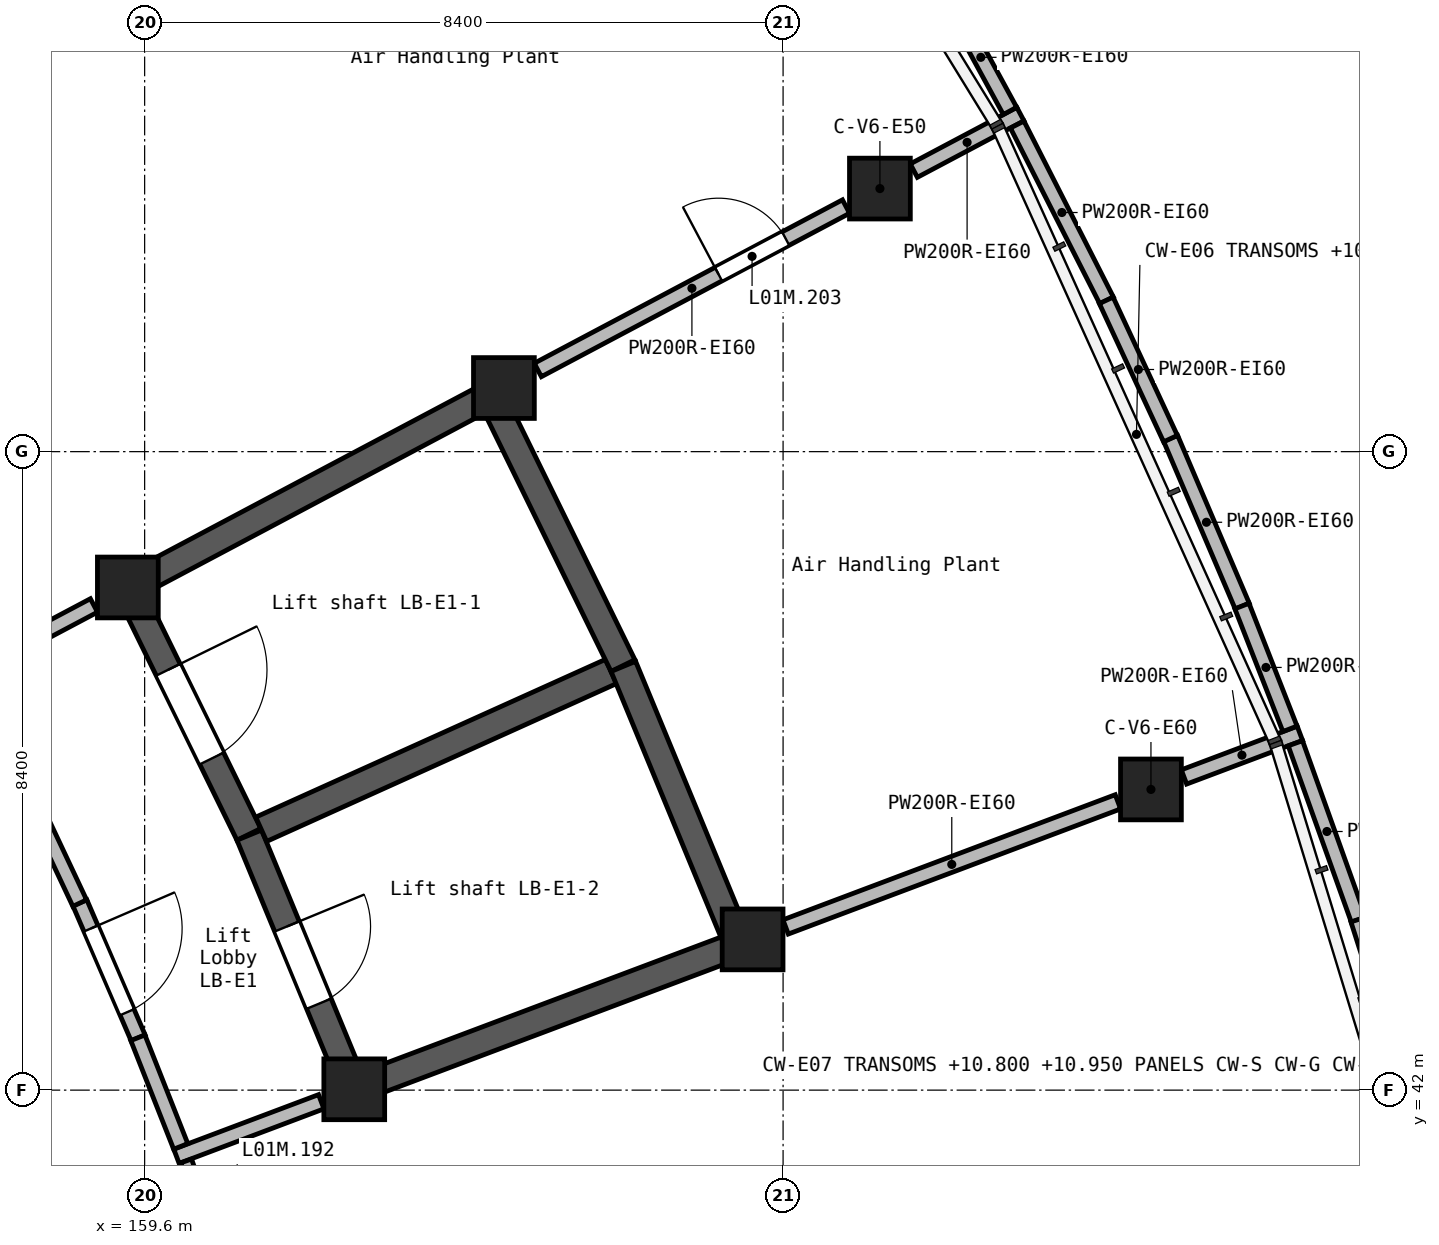
"""IFC4 building model, lengths in metres.
Left out: names, types, materials, properties, quantities, classifications, styles, units other than length and angle.
Written with IfcOpenShell. Run it as: python <this file> out.ifc"""

import sys

from ifc_helpers import new_model, si_unit, direction, frame, frame_2d, origin, origin_2d, place, context, subcontext, project, spatial, rectangle, extrude, element, fill, save


model = new_model("IFC4")
c1 = context("Model", 3, precision=1e-05, world=origin(), true_north=direction((0.0, 1.0)))
c2 = subcontext(c1, "Body", "Model", "MODEL_VIEW")
j1 = project(units=[si_unit("LENGTHUNIT", "METRE"), si_unit("PLANEANGLEUNIT", "RADIAN")], contexts=[c1])
p1 = place(None, origin())
s1 = spatial("IfcSite", under=j1, at=p1, CompositionType="ELEMENT")
p2 = place(p1, origin())
s2 = spatial("IfcBuilding", under=s1, at=p2, CompositionType="ELEMENT")
p3 = place(p2, frame((0.0, 0.0, 9.9)))
s3 = spatial("IfcBuildingStorey", under=s2, at=p3, CompositionType="ELEMENT", Elevation=9.9)
for number, where, z_axis, x_axis in (
    (1, (159.379, 48.613, 0.0), (0.0, 0.0, 1.0), (1.0, 0.0, 0.0)),
    (2, (162.358, 42.011, 0.0), (0.0, 0.0, 1.0), (1.0, 0.0, 0.0)),
    (3, (164.327, 51.237, 0.0), (0.0, 0.0, 1.0), (1.0, 0.0, 0.0)),
    (4, (167.599, 43.983, 0.0), (0.0, 0.0, 1.0), (1.0, 0.0, 0.0)),
    (5, (169.274, 53.861, 0.0), (0.0, 0.0, 1.0), (1.0, 0.0, 0.0)),
    (6, (172.84, 45.956, 0.0), (0.0, 0.0, 1.0), (1.0, 0.0, 0.0)),
):
    element("IfcColumn", number, at=place(p3, frame(where, z_axis=z_axis, x_axis=x_axis)), inside=s3, PredefinedType="COLUMN", context=c2, shape_type="SweptSolid", body=[
        extrude(rectangle(XDim=0.8, YDim=0.8, at=origin_2d()), origin(), (0.0, 0.0, 1.0), 2.7),
    ])
p4 = place(p3, frame((159.224, 48.531, 0.0), z_axis=(0.0, 0.0, 1.0), x_axis=(0.883393138637, 0.468632652094, 0.0)))
e7 = element("IfcWall", 7, at=p4, inside=s3, PredefinedType="SHEAR", context=c2, shape_type="SweptSolid", body=[
    extrude(rectangle(XDim=5.751, YDim=0.35, at=frame_2d((2.875, 0.0))), origin(), (0.0, 0.0, 1.0), 2.7),
])
p5 = place(p3, frame((159.456, 48.456, 0.0), z_axis=(0.0, 0.0, 1.0), x_axis=(0.440221126053, -0.89788939195, 0.0)))
e8 = element("IfcWall", 8, at=p5, inside=s3, PredefinedType="SHEAR", context=c2, shape_type="SweptSolid", body=[
    extrude(rectangle(XDim=3.442, YDim=0.35, at=frame_2d((1.721, 0.0))), origin(), (0.0, 0.0, 1.0), 2.7),
])
p6 = place(p5, frame((1.031, 0.0, 0.0)))
e9 = element("IfcOpeningElement", 9, at=p6, cuts=e8, PredefinedType="OPENING", context=c2, shape_type="SweptSolid", body=[
    extrude(rectangle(XDim=1.3, YDim=2.1, at=frame_2d((0.65, 1.05))), frame((0.0, 0.185, 0.0), z_axis=(0.0, -1.0, 0.0), x_axis=(1.0, 0.0, 0.0)), (0.0, 0.0, 1.0), 0.37),
])
p7 = place(p3, frame((160.976, 45.355, 0.0), z_axis=(0.0, 0.0, 1.0), x_axis=(0.381990591944, -0.924166212143, 0.0)))
e10 = element("IfcWall", 10, at=p7, inside=s3, PredefinedType="SHEAR", context=c2, shape_type="SweptSolid", body=[
    extrude(rectangle(XDim=3.443, YDim=0.35, at=frame_2d((1.721, 0.0))), origin(), (0.0, 0.0, 1.0), 2.7),
])
p8 = place(p7, frame((1.3, 0.0, 0.0)))
e11 = element("IfcOpeningElement", 11, at=p8, cuts=e10, PredefinedType="OPENING", context=c2, shape_type="SweptSolid", body=[
    extrude(rectangle(XDim=1.1, YDim=2.1, at=frame_2d((0.55, 1.05))), frame((0.0, 0.185, 0.0), z_axis=(0.0, -1.0, 0.0), x_axis=(1.0, 0.0, 0.0)), (0.0, 0.0, 1.0), 0.37),
])
p9 = place(p3, frame((161.134, 45.432, 0.0), z_axis=(0.0, 0.0, 1.0), x_axis=(0.911564728385, 0.411156595427, 0.0)))
e12 = element("IfcWall", 12, at=p9, inside=s3, PredefinedType="SHEAR", context=c2, shape_type="SweptSolid", body=[
    extrude(rectangle(XDim=5.05, YDim=0.35, at=frame_2d((2.525, 0.0))), origin(), (0.0, 0.0, 1.0), 2.7),
])
p10 = place(p3, frame((162.194, 41.949, 0.0), z_axis=(0.0, 0.0, 1.0), x_axis=(0.935920223106, 0.352212061095, 0.0)))
e13 = element("IfcWall", 13, at=p10, inside=s3, PredefinedType="SHEAR", context=c2, shape_type="SweptSolid", body=[
    extrude(rectangle(XDim=5.75, YDim=0.35, at=frame_2d((2.875, 0.0))), origin(), (0.0, 0.0, 1.0), 2.7),
])
p11 = place(p3, frame((165.894, 47.585, 0.0), z_axis=(0.0, 0.0, 1.0), x_axis=(-0.43992897418, 0.898032570499, 0.0)))
e14 = element("IfcWall", 14, at=p11, inside=s3, PredefinedType="SHEAR", context=c2, shape_type="SweptSolid", body=[
    extrude(rectangle(XDim=3.788, YDim=0.35, at=frame_2d((1.894, 0.0))), origin(), (0.0, 0.0, 1.0), 2.7),
])
p12 = place(p3, frame((167.345, 44.075, 0.0), z_axis=(0.0, 0.0, 1.0), x_axis=(-0.382046231428, 0.924143212415, 0.0)))
e15 = element("IfcWall", 15, at=p12, inside=s3, PredefinedType="SHEAR", context=c2, shape_type="SweptSolid", body=[
    extrude(rectangle(XDim=3.788, YDim=0.35, at=frame_2d((1.894, 0.0))), origin(), (0.0, 0.0, 1.0), 2.7),
])
p13 = place(p3, frame((156.036, 55.103, 0.0), z_axis=(0.0, 0.0, 1.0), x_axis=(0.816634904938, 0.57715459977, 0.0)))
e16 = element("IfcWall", 16, at=p13, inside=s3, PredefinedType="SOLIDWALL", context=c2, shape_type="SweptSolid", body=[
    extrude(rectangle(XDim=4.493, YDim=0.2, at=frame_2d((2.246, 0.0))), origin(), (0.0, 0.0, 1.0), 2.45),
])
p14 = place(p3, frame((168.033, 44.147, 0.0), z_axis=(0.0, 0.0, 1.0), x_axis=(0.935873083575, 0.352337297826, 0.0)))
e17 = element("IfcWall", 17, at=p14, inside=s3, PredefinedType="SOLIDWALL", context=c2, shape_type="SweptSolid", body=[
    extrude(rectangle(XDim=4.672, YDim=0.2, at=frame_2d((2.336, 0.0))), origin(), (0.0, 0.0, 1.0), 2.45),
])
p15 = place(p3, frame((173.274, 46.12, 0.0), z_axis=(0.0, 0.0, 1.0), x_axis=(0.9359160175, 0.352223236296, 0.0)))
e18 = element("IfcWall", 18, at=p15, inside=s3, PredefinedType="SOLIDWALL", context=c2, shape_type="SweptSolid", body=[
    extrude(rectangle(XDim=1.63, YDim=0.2, at=frame_2d((0.815, 0.0))), origin(), (0.0, 0.0, 1.0), 2.45),
])
p16 = place(p3, frame((164.773, 51.474, 0.0), z_axis=(0.0, 0.0, 1.0), x_axis=(0.883491454613, 0.468447275182, 0.0)))
e19 = element("IfcWall", 19, at=p16, inside=s3, PredefinedType="SOLIDWALL", context=c2, shape_type="SweptSolid", body=[
    extrude(rectangle(XDim=4.59, YDim=0.2, at=frame_2d((2.295, 0.0))), origin(), (0.0, 0.0, 1.0), 2.45),
])
p17 = place(p16, frame((2.691, 0.0, 0.0)))
e20 = element("IfcOpeningElement", 20, at=p17, cuts=e19, PredefinedType="OPENING", context=c2, shape_type="SweptSolid", body=[
    extrude(rectangle(XDim=1.0, YDim=2.1, at=frame_2d((0.5, 1.05))), frame((0.0, 0.11, 0.0), z_axis=(0.0, -1.0, 0.0), x_axis=(1.0, 0.0, 0.0)), (0.0, 0.0, 1.0), 0.22),
])
p18 = place(p3, frame((169.72, 54.097, 0.0), z_axis=(0.0, 0.0, 1.0), x_axis=(0.883465960298, 0.468495354294, 0.0)))
e21 = element("IfcWall", 21, at=p18, inside=s3, PredefinedType="SOLIDWALL", context=c2, shape_type="SweptSolid", body=[
    extrude(rectangle(XDim=1.587, YDim=0.2, at=frame_2d((0.794, 0.0))), origin(), (0.0, 0.0, 1.0), 2.45),
])
p19 = place(p3, frame((171.08, 54.703, 0.0), z_axis=(0.0, 0.0, 1.0), x_axis=(0.453071901169, -0.891473977394, 0.0)))
e22 = element("IfcWall", 22, at=p19, inside=s3, PredefinedType="SOLIDWALL", context=c2, shape_type="SweptSolid", body=[
    extrude(rectangle(XDim=2.596, YDim=0.2, at=frame_2d((1.298, 0.0))), origin(), (0.0, 0.0, 1.0), 2.45),
])
p20 = place(p3, frame((174.74, 46.563, 0.0), z_axis=(0.0, 0.0, 1.0), x_axis=(0.33685697068, -0.941555830158, 0.0)))
e23 = element("IfcWall", 23, at=p20, inside=s3, PredefinedType="SOLIDWALL", context=c2, shape_type="SweptSolid", body=[
    extrude(rectangle(XDim=2.466, YDim=0.2, at=frame_2d((1.233, 0.0))), origin(), (0.0, 0.0, 1.0), 2.45),
])
p21 = place(p3, frame((160.018, 41.13, 0.0), z_axis=(0.0, 0.0, 1.0), x_axis=(0.935835444075, 0.352437259115, 0.0)))
e24 = element("IfcWall", 24, at=p21, inside=s3, PredefinedType="SOLIDWALL", context=c2, shape_type="SweptSolid", body=[
    extrude(rectangle(XDim=2.036, YDim=0.2, at=frame_2d((1.018, 0.0))), origin(), (0.0, 0.0, 1.0), 2.45),
])
p22 = place(p3, frame((157.171, 47.442, 0.0), z_axis=(0.0, 0.0, 1.0), x_axis=(0.883475149074, 0.468478026133, 0.0)))
e25 = element("IfcWall", 25, at=p22, inside=s3, PredefinedType="SOLIDWALL", context=c2, shape_type="SweptSolid", body=[
    extrude(rectangle(XDim=1.995, YDim=0.2, at=frame_2d((0.998, 0.0))), origin(), (0.0, 0.0, 1.0), 2.45),
])
p23 = place(p3, frame((173.099, 50.575, 0.0), z_axis=(0.0, 0.0, 1.0), x_axis=(0.392630236763, -0.91969641577, 0.0)))
e26 = element("IfcWall", 26, at=p23, inside=s3, PredefinedType="SOLIDWALL", context=c2, shape_type="SweptSolid", body=[
    extrude(rectangle(XDim=2.401, YDim=0.2, at=frame_2d((1.2, 0.0))), origin(), (0.0, 0.0, 1.0), 2.45),
])
p24 = place(p3, frame((175.566, 44.244, 0.0), z_axis=(0.0, 0.0, 1.0), x_axis=(0.304438045887, -0.952532139204, 0.0)))
e27 = element("IfcWall", 27, at=p24, inside=s3, PredefinedType="SOLIDWALL", context=c2, shape_type="SweptSolid", body=[
    extrude(rectangle(XDim=2.204, YDim=0.2, at=frame_2d((1.102, 0.0))), origin(), (0.0, 0.0, 1.0), 2.45),
])
p25 = place(p3, frame((172.252, 52.39, 0.0), z_axis=(0.0, 0.0, 1.0), x_axis=(0.421379419174, -0.906884438667, 0.0)))
e28 = element("IfcWall", 28, at=p25, inside=s3, PredefinedType="SOLIDWALL", context=c2, shape_type="SweptSolid", body=[
    extrude(rectangle(XDim=2.006, YDim=0.2, at=frame_2d((1.003, 0.0))), origin(), (0.0, 0.0, 1.0), 2.45),
])
p26 = place(p3, frame((174.037, 48.369, 0.0), z_axis=(0.0, 0.0, 1.0), x_axis=(0.364293197487, -0.931284310114, 0.0)))
e29 = element("IfcWall", 29, at=p26, inside=s3, PredefinedType="SOLIDWALL", context=c2, shape_type="SweptSolid", body=[
    extrude(rectangle(XDim=1.734, YDim=0.2, at=frame_2d((0.867, 0.0))), origin(), (0.0, 0.0, 1.0), 2.45),
])
p27 = place(p3, frame((170.217, 56.293, 0.0), z_axis=(0.0, 0.0, 1.0), x_axis=(0.478500537787, -0.878087259523, 0.0)))
e30 = element("IfcWall", 30, at=p27, inside=s3, PredefinedType="SOLIDWALL", context=c2, shape_type="SweptSolid", body=[
    extrude(rectangle(XDim=1.606, YDim=0.2, at=frame_2d((0.803, 0.0))), origin(), (0.0, 0.0, 1.0), 2.45),
])
p28 = place(p3, frame((158.747, 44.465, 0.0), z_axis=(0.0, 0.0, 1.0), x_axis=(0.396322487651, -0.918111368943, 0.0)))
e31 = element("IfcWall", 31, at=p28, inside=s3, PredefinedType="SOLIDWALL", context=c2, shape_type="SweptSolid", body=[
    extrude(rectangle(XDim=1.936, YDim=0.2, at=frame_2d((0.968, 0.0))), origin(), (0.0, 0.0, 1.0), 2.45),
])
p29 = place(p28, frame((0.368, 0.0, 0.0)))
e32 = element("IfcOpeningElement", 32, at=p29, cuts=e31, PredefinedType="OPENING", context=c2, shape_type="SweptSolid", body=[
    extrude(rectangle(XDim=1.2, YDim=2.1, at=frame_2d((0.6, 1.05))), frame((0.0, 0.11, 0.0), z_axis=(0.0, -1.0, 0.0), x_axis=(1.0, 0.0, 0.0)), (0.0, 0.0, 1.0), 0.22),
])
p30 = place(p3, frame((158.089, 45.855, 0.0), z_axis=(0.0, 0.0, 1.0), x_axis=(0.42579703633, -0.904818702201, 0.0)))
e33 = element("IfcWall", 33, at=p30, inside=s3, PredefinedType="SOLIDWALL", context=c2, shape_type="SweptSolid", body=[
    extrude(rectangle(XDim=1.541, YDim=0.2, at=frame_2d((0.771, 0.0))), origin(), (0.0, 0.0, 1.0), 2.45),
])
p31 = place(p3, frame((159.51, 42.689, 0.0), z_axis=(0.0, 0.0, 1.0), x_axis=(0.367195475631, -0.930143796773, 0.0)))
e34 = element("IfcWall", 34, at=p31, inside=s3, PredefinedType="SOLIDWALL", context=c2, shape_type="SweptSolid", body=[
    extrude(rectangle(XDim=1.537, YDim=0.2, at=frame_2d((0.768, 0.0))), origin(), (0.0, 0.0, 1.0), 2.45),
])
p32 = place(p3, frame((160.146, 41.068, 0.0), z_axis=(0.0, 0.0, 1.0), x_axis=(0.334170983673, -0.942512468708, 0.0)))
e35 = element("IfcWall", 35, at=p32, inside=s3, PredefinedType="PARTITIONING", context=c2, shape_type="SweptSolid", body=[
    extrude(rectangle(XDim=2.079, YDim=0.15, at=frame_2d((1.04, 0.0))), origin(), (0.0, 0.0, 1.0), 2.45),
])
p33 = place(p32, frame((0.501, 0.0, 0.0)))
e36 = element("IfcOpeningElement", 36, at=p33, cuts=e35, PredefinedType="OPENING", context=c2, shape_type="SweptSolid", body=[
    extrude(rectangle(XDim=0.9, YDim=2.1, at=frame_2d((0.45, 1.05))), frame((0.0, 0.085, 0.0), z_axis=(0.0, -1.0, 0.0), x_axis=(1.0, 0.0, 0.0)), (0.0, 0.0, 1.0), 0.17),
])
p34 = place(p29, origin())
e37 = element("IfcDoor", 37, at=p34, inside=s3, OperationType="SINGLE_SWING_LEFT", PredefinedType="DOOR", context=c2, shape_type="SweptSolid", body=[
    extrude(rectangle(XDim=1.2, YDim=2.1, at=frame_2d((0.6, 1.05))), frame((0.0, 0.025, 0.0), z_axis=(0.0, -1.0, 0.0), x_axis=(1.0, 0.0, 0.0)), (0.0, 0.0, 1.0), 0.05),
])
fill(e32, e37)
p35 = place(p17, frame((1.0, 0.0, 0.0), z_axis=(0.0, 0.0, 1.0), x_axis=(-1.0, 0.0, 0.0)))
e38 = element("IfcDoor", 38, at=p35, inside=s3, OperationType="SINGLE_SWING_LEFT", PredefinedType="DOOR", context=c2, shape_type="SweptSolid", body=[
    extrude(rectangle(XDim=1.0, YDim=2.1, at=frame_2d((0.5, 1.05))), frame((0.0, 0.025, 0.0), z_axis=(0.0, -1.0, 0.0), x_axis=(1.0, 0.0, 0.0)), (0.0, 0.0, 1.0), 0.05),
])
fill(e20, e38)
p36 = place(p6, origin())
e39 = element("IfcDoor", 39, at=p36, inside=s3, OperationType="DOUBLE_DOOR_SLIDING", PredefinedType="DOOR", context=c2, shape_type="SweptSolid", body=[
    extrude(rectangle(XDim=1.3, YDim=2.1, at=frame_2d((0.65, 1.05))), frame((0.0, 0.025, 0.0), z_axis=(0.0, -1.0, 0.0), x_axis=(1.0, 0.0, 0.0)), (0.0, 0.0, 1.0), 0.05),
])
fill(e9, e39)
p37 = place(p8, origin())
e40 = element("IfcDoor", 40, at=p37, inside=s3, OperationType="DOUBLE_DOOR_SLIDING", PredefinedType="DOOR", context=c2, shape_type="SweptSolid", body=[
    extrude(rectangle(XDim=1.1, YDim=2.1, at=frame_2d((0.55, 1.05))), frame((0.0, 0.025, 0.0), z_axis=(0.0, -1.0, 0.0), x_axis=(1.0, 0.0, 0.0)), (0.0, 0.0, 1.0), 0.05),
])
fill(e11, e40)
save(model, sys.argv[1])
